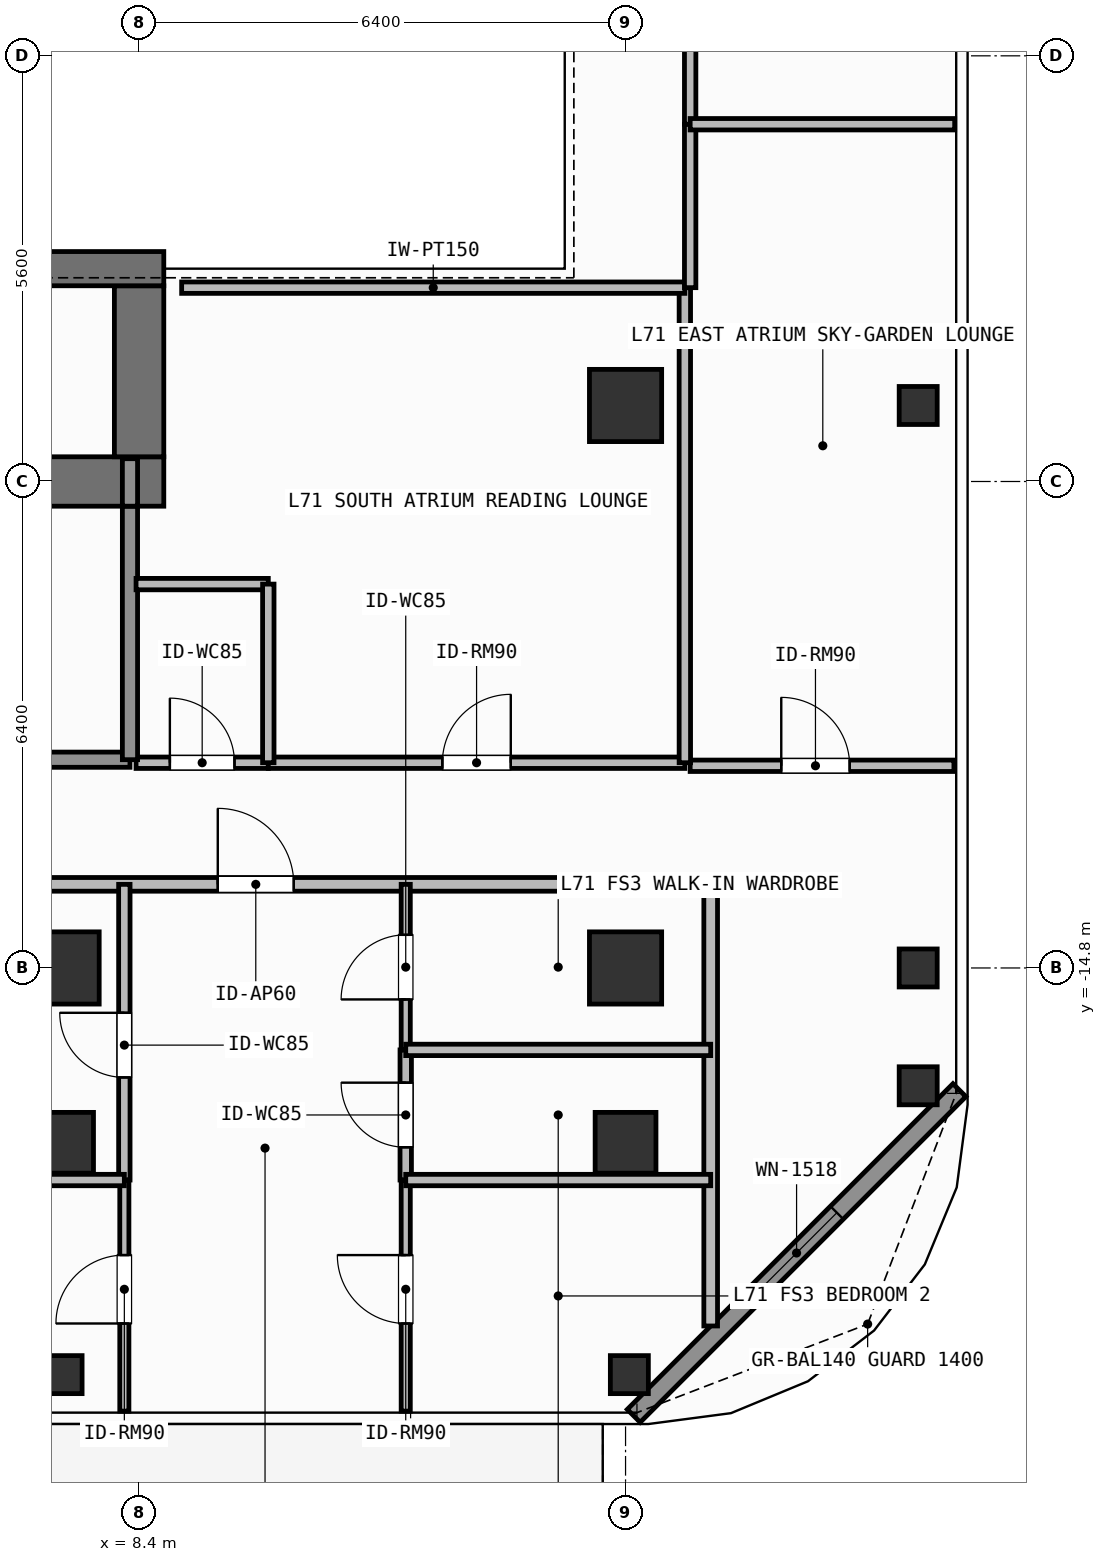
"""IFC4 building model, lengths in metres.
Left out: names, types, materials, properties, quantities, classifications, styles, units other than length and angle.
Written with IfcOpenShell. Run it as: python <this file> out.ifc"""

import sys

from ifc_helpers import new_model, si_unit, direction, frame, frame_2d, origin, origin_2d, place, context, subcontext, project, spatial, rectangle, hollow_rectangle, extrude, element, fill, save


model = new_model("IFC4")
c1 = context("Model", 3, precision=1e-05, world=origin(), true_north=direction((0.0, 1.0)))
c2 = subcontext(c1, "Body", "Model", "MODEL_VIEW")
j1 = project(units=[si_unit("LENGTHUNIT", "METRE"), si_unit("PLANEANGLEUNIT", "RADIAN")], contexts=[c1])
p1 = place(None, origin())
s1 = spatial("IfcSite", under=j1, at=p1, CompositionType="ELEMENT")
p2 = place(p1, origin())
s2 = spatial("IfcBuilding", under=s1, at=p2, CompositionType="ELEMENT")
p3 = place(p2, frame((0.0, 0.0, 289.8)))
s3 = spatial("IfcBuildingStorey", under=s2, at=p3, CompositionType="ELEMENT", Elevation=289.8)
p4 = place(p3, frame((6.12, -8.4, 0.0), z_axis=(0.0, 0.0, 1.0), x_axis=(1.0, 0.0, 0.0)))
e1 = element("IfcWall", 1, at=p4, inside=s3, PredefinedType="SHEAR", context=c2, shape_type="SweptSolid", body=[
    extrude(rectangle(XDim=2.605, YDim=0.65, at=frame_2d((1.302, 0.0))), origin(), (0.0, 0.0, 1.0), 3.9),
])
p5 = place(p3, frame((8.4, -8.075, 0.0), z_axis=(0.0, 0.0, 1.0), x_axis=(0.0, 1.0, 0.0)))
e2 = element("IfcWall", 2, at=p5, inside=s3, PredefinedType="SHEAR", context=c2, shape_type="SweptSolid", body=[
    extrude(rectangle(XDim=2.25, YDim=0.65, at=frame_2d((1.125, 0.0))), origin(), (0.0, 0.0, 1.0), 3.9),
])
p6 = place(p3, frame((3.045, -5.6, 0.0), z_axis=(0.0, 0.0, 1.0), x_axis=(1.0, 0.0, 0.0)))
e3 = element("IfcWall", 3, at=p6, inside=s3, PredefinedType="SHEAR", context=c2, shape_type="SweptSolid", body=[
    extrude(rectangle(XDim=5.68, YDim=0.45, at=frame_2d((2.84, 0.0))), origin(), (0.0, 0.0, 1.0), 3.9),
])
for number, where, z_axis, x_axis in (
    (4, (7.4, -14.8, 0.0), (0.0, 0.0, 1.0), (1.0, 0.0, 0.0)),
    (5, (14.8, -14.8, 0.0), (0.0, 0.0, 1.0), (1.0, 0.0, 0.0)),
    (6, (14.8, -7.4, 0.0), (0.0, 0.0, 1.0), (1.0, 0.0, 0.0)),
):
    element("IfcColumn", number, at=place(p3, frame(where, z_axis=z_axis, x_axis=x_axis)), inside=s3, PredefinedType="COLUMN", context=c2, shape_type="SweptSolid", body=[
        extrude(rectangle(XDim=0.95, YDim=0.95, at=origin_2d()), origin(), (0.0, 0.0, 1.0), 3.9),
    ])
for number, where, z_axis, x_axis in (
    (7, (7.4, -17.1, 0.0), (0.0, 0.0, 1.0), (1.0, 0.0, 0.0)),
    (8, (14.8, -17.1, 0.0), (0.0, 0.0, 1.0), (1.0, 0.0, 0.0)),
):
    element("IfcColumn", number, at=place(p3, frame(where, z_axis=z_axis, x_axis=x_axis)), inside=s3, PredefinedType="COLUMN", context=c2, shape_type="SweptSolid", body=[
        extrude(hollow_rectangle(XDim=0.8, YDim=0.8, WallThickness=0.036, at=origin_2d()), origin(), (0.0, 0.0, 1.0), 3.9),
    ])
for number, where, z_axis, x_axis in (
    (9, (14.85, -20.15, 0.0), (0.0, 0.0, 1.0), (1.0, 0.0, 0.0)),
    (10, (18.65, -16.35, 0.0), (0.0, 0.0, 1.0), (1.0, 0.0, 0.0)),
    (11, (7.4, -20.15, 0.0), (0.0, 0.0, 1.0), (1.0, 0.0, 0.0)),
    (12, (18.65, -14.8, 0.0), (0.0, 0.0, 1.0), (1.0, 0.0, 0.0)),
    (13, (18.65, -7.4, 0.0), (0.0, 0.0, 1.0), (1.0, 0.0, 0.0)),
):
    element("IfcColumn", number, at=place(p3, frame(where, z_axis=z_axis, x_axis=x_axis)), inside=s3, PredefinedType="COLUMN", context=c2, shape_type="SweptSolid", body=[
        extrude(hollow_rectangle(XDim=0.5, YDim=0.5, WallThickness=0.025, at=origin_2d()), origin(), (0.0, 0.0, 1.0), 3.9),
    ])
p7 = place(p3, frame((19.192, -16.408, 0.0), z_axis=(0.0, 0.0, 1.0), x_axis=(-0.707106781187, -0.707106781187, 0.0)))
e14 = element("IfcWall", 14, at=p7, inside=s3, PredefinedType="SOLIDWALL", context=c2, shape_type="SweptSolid", body=[
    extrude(rectangle(XDim=6.059, YDim=0.24, at=frame_2d((3.03, 0.0))), origin(), (0.0, 0.0, 1.0), 3.68),
])
p8 = place(p7, frame((2.28, 0.0, 0.8)))
e15 = element("IfcOpeningElement", 15, at=p8, cuts=e14, PredefinedType="OPENING", context=c2, shape_type="SweptSolid", body=[
    extrude(rectangle(XDim=1.5, YDim=1.85, at=frame_2d((0.75, 0.925))), frame((0.0, 0.13, 0.0), z_axis=(0.0, -1.0, 0.0), x_axis=(1.0, 0.0, 0.0)), (0.0, 0.0, 1.0), 0.26),
])
p9 = place(p3, frame((4.58, -12.06, 0.0), z_axis=(0.0, 0.0, 1.0), x_axis=(1.0, 0.0, 0.0)))
e16 = element("IfcWall", 16, at=p9, inside=s3, PredefinedType="SOLIDWALL", context=c2, shape_type="SweptSolid", body=[
    extrude(rectangle(XDim=3.7, YDim=0.2, at=frame_2d((1.85, 0.0))), origin(), (0.0, 0.0, 1.0), 3.68),
])
p10 = place(p9, frame((1.212, 0.0, 0.0)))
e17 = element("IfcOpeningElement", 17, at=p10, cuts=e16, PredefinedType="OPENING", context=c2, shape_type="SweptSolid", body=[
    extrude(rectangle(XDim=1.1, YDim=2.15, at=frame_2d((0.55, 1.075))), frame((0.0, 0.11, 0.0), z_axis=(0.0, -1.0, 0.0), x_axis=(1.0, 0.0, 0.0)), (0.0, 0.0, 1.0), 0.22),
])
p11 = place(p3, frame((8.36, -12.1, 0.0), z_axis=(0.0, 0.0, 1.0), x_axis=(1.0, 0.0, 0.0)))
e18 = element("IfcWall", 18, at=p11, inside=s3, PredefinedType="PARTITIONING", context=c2, shape_type="SweptSolid", body=[
    extrude(rectangle(XDim=1.74, YDim=0.15, at=frame_2d((0.87, 0.0))), origin(), (0.0, 0.0, 1.0), 3.68),
])
p12 = place(p11, frame((0.445, 0.0, 0.0)))
e19 = element("IfcOpeningElement", 19, at=p12, cuts=e18, PredefinedType="OPENING", context=c2, shape_type="SweptSolid", body=[
    extrude(rectangle(XDim=0.85, YDim=2.1, at=frame_2d((0.425, 1.05))), frame((0.0, 0.085, 0.0), z_axis=(0.0, -1.0, 0.0), x_axis=(1.0, 0.0, 0.0)), (0.0, 0.0, 1.0), 0.17),
])
p13 = place(p3, frame((10.1, -12.1, 0.0), z_axis=(0.0, 0.0, 1.0), x_axis=(1.0, 0.0, 0.0)))
e20 = element("IfcWall", 20, at=p13, inside=s3, PredefinedType="PARTITIONING", context=c2, shape_type="SweptSolid", body=[
    extrude(rectangle(XDim=5.48, YDim=0.15, at=frame_2d((2.74, 0.0))), origin(), (0.0, 0.0, 1.0), 3.68),
])
p14 = place(p13, frame((2.29, 0.0, 0.0)))
e21 = element("IfcOpeningElement", 21, at=p14, cuts=e20, PredefinedType="OPENING", context=c2, shape_type="SweptSolid", body=[
    extrude(rectangle(XDim=0.9, YDim=2.1, at=frame_2d((0.45, 1.05))), frame((0.0, 0.085, 0.0), z_axis=(0.0, -1.0, 0.0), x_axis=(1.0, 0.0, 0.0)), (0.0, 0.0, 1.0), 0.17),
])
p15 = place(p3, frame((3.063, -13.7, 0.0), z_axis=(0.0, 0.0, 1.0), x_axis=(1.0, 0.0, 0.0)))
e22 = element("IfcWall", 22, at=p15, inside=s3, PredefinedType="PARTITIONING", context=c2, shape_type="SweptSolid", body=[
    extrude(rectangle(XDim=12.857, YDim=0.18, at=frame_2d((6.428, 0.0))), origin(), (0.0, 0.0, 1.0), 3.68),
])
p16 = place(p15, frame((6.372, 0.0, 0.0)))
e23 = element("IfcOpeningElement", 23, at=p16, cuts=e22, PredefinedType="OPENING", context=c2, shape_type="SweptSolid", body=[
    extrude(rectangle(XDim=1.0, YDim=2.2, at=frame_2d((0.5, 1.1))), frame((0.0, 0.1, 0.0), z_axis=(0.0, -1.0, 0.0), x_axis=(1.0, 0.0, 0.0)), (0.0, 0.0, 1.0), 0.2),
])
p17 = place(p3, frame((8.206, -17.59, 0.0), z_axis=(0.0, 0.0, 1.0), x_axis=(0.0, 1.0, 0.0)))
e24 = element("IfcWall", 24, at=p17, inside=s3, PredefinedType="PARTITIONING", context=c2, shape_type="SweptSolid", body=[
    extrude(rectangle(XDim=3.89, YDim=0.15, at=frame_2d((1.945, 0.0))), origin(), (0.0, 0.0, 1.0), 3.68),
])
p18 = place(p17, frame((1.35, 0.0, 0.0)))
e25 = element("IfcOpeningElement", 25, at=p18, cuts=e24, PredefinedType="OPENING", context=c2, shape_type="SweptSolid", body=[
    extrude(rectangle(XDim=0.85, YDim=2.1, at=frame_2d((0.425, 1.05))), frame((0.0, 0.085, 0.0), z_axis=(0.0, -1.0, 0.0), x_axis=(1.0, 0.0, 0.0)), (0.0, 0.0, 1.0), 0.17),
])
p19 = place(p3, frame((8.206, -20.63, 0.0), z_axis=(0.0, 0.0, 1.0), x_axis=(0.0, 1.0, 0.0)))
e26 = element("IfcWall", 26, at=p19, inside=s3, PredefinedType="PARTITIONING", context=c2, shape_type="SweptSolid", body=[
    extrude(rectangle(XDim=3.04, YDim=0.12, at=frame_2d((1.52, 0.0))), origin(), (0.0, 0.0, 1.0), 3.68),
])
p20 = place(p19, frame((1.153, 0.0, 0.0)))
e27 = element("IfcOpeningElement", 27, at=p20, cuts=e26, PredefinedType="OPENING", context=c2, shape_type="SweptSolid", body=[
    extrude(rectangle(XDim=0.9, YDim=2.1, at=frame_2d((0.45, 1.05))), frame((0.0, 0.07, 0.0), z_axis=(0.0, -1.0, 0.0), x_axis=(1.0, 0.0, 0.0)), (0.0, 0.0, 1.0), 0.14),
])
p21 = place(p3, frame((11.908, -17.59, 0.0), z_axis=(0.0, 0.0, 1.0), x_axis=(0.0, 1.0, 0.0)))
e28 = element("IfcWall", 28, at=p21, inside=s3, PredefinedType="PARTITIONING", context=c2, shape_type="SweptSolid", body=[
    extrude(rectangle(XDim=1.712, YDim=0.15, at=frame_2d((0.856, 0.0))), origin(), (0.0, 0.0, 1.0), 3.68),
])
p22 = place(p21, frame((0.431, 0.0, 0.0)))
e29 = element("IfcOpeningElement", 29, at=p22, cuts=e28, PredefinedType="OPENING", context=c2, shape_type="SweptSolid", body=[
    extrude(rectangle(XDim=0.85, YDim=2.1, at=frame_2d((0.425, 1.05))), frame((0.0, 0.085, 0.0), z_axis=(0.0, -1.0, 0.0), x_axis=(1.0, 0.0, 0.0)), (0.0, 0.0, 1.0), 0.17),
])
p23 = place(p3, frame((11.908, -15.878, 0.0), z_axis=(0.0, 0.0, 1.0), x_axis=(0.0, 1.0, 0.0)))
e30 = element("IfcWall", 30, at=p23, inside=s3, PredefinedType="PARTITIONING", context=c2, shape_type="SweptSolid", body=[
    extrude(rectangle(XDim=2.178, YDim=0.12, at=frame_2d((1.089, 0.0))), origin(), (0.0, 0.0, 1.0), 3.68),
])
p24 = place(p23, frame((0.664, 0.0, 0.0)))
e31 = element("IfcOpeningElement", 31, at=p24, cuts=e30, PredefinedType="OPENING", context=c2, shape_type="SweptSolid", body=[
    extrude(rectangle(XDim=0.85, YDim=2.1, at=frame_2d((0.425, 1.05))), frame((0.0, 0.07, 0.0), z_axis=(0.0, -1.0, 0.0), x_axis=(1.0, 0.0, 0.0)), (0.0, 0.0, 1.0), 0.14),
])
p25 = place(p3, frame((11.908, -20.63, 0.0), z_axis=(0.0, 0.0, 1.0), x_axis=(0.0, 1.0, 0.0)))
e32 = element("IfcWall", 32, at=p25, inside=s3, PredefinedType="PARTITIONING", context=c2, shape_type="SweptSolid", body=[
    extrude(rectangle(XDim=3.04, YDim=0.12, at=frame_2d((1.52, 0.0))), origin(), (0.0, 0.0, 1.0), 3.68),
])
p26 = place(p25, frame((1.153, 0.0, 0.0)))
e33 = element("IfcOpeningElement", 33, at=p26, cuts=e32, PredefinedType="OPENING", context=c2, shape_type="SweptSolid", body=[
    extrude(rectangle(XDim=0.9, YDim=2.1, at=frame_2d((0.45, 1.05))), frame((0.0, 0.07, 0.0), z_axis=(0.0, -1.0, 0.0), x_axis=(1.0, 0.0, 0.0)), (0.0, 0.0, 1.0), 0.14),
])
p27 = place(p3, frame((15.65, -12.14, 0.0), z_axis=(0.0, 0.0, 1.0), x_axis=(1.0, 0.0, 0.0)))
e34 = element("IfcWall", 34, at=p27, inside=s3, PredefinedType="PARTITIONING", context=c2, shape_type="SweptSolid", body=[
    extrude(rectangle(XDim=3.47, YDim=0.15, at=frame_2d((1.735, 0.0))), origin(), (0.0, 0.0, 1.0), 3.68),
])
p28 = place(p27, frame((1.198, 0.0, 0.0)))
e35 = element("IfcOpeningElement", 35, at=p28, cuts=e34, PredefinedType="OPENING", context=c2, shape_type="SweptSolid", body=[
    extrude(rectangle(XDim=0.9, YDim=2.1, at=frame_2d((0.45, 1.05))), frame((0.0, 0.085, 0.0), z_axis=(0.0, -1.0, 0.0), x_axis=(1.0, 0.0, 0.0)), (0.0, 0.0, 1.0), 0.17),
])
p29 = place(p3, frame((8.28, -12.06, 0.0), z_axis=(0.0, 0.0, 1.0), x_axis=(0.0, 1.0, 0.0)))
e36 = element("IfcWall", 36, at=p29, inside=s3, PredefinedType="SOLIDWALL", context=c2, shape_type="SweptSolid", body=[
    extrude(rectangle(XDim=3.335, YDim=0.2, at=frame_2d((1.667, 0.0))), origin(), (0.0, 0.0, 1.0), 3.68),
])
p30 = place(p3, frame((8.28, -8.725, 0.0), z_axis=(0.0, 0.0, 1.0), x_axis=(0.0, 1.0, 0.0)))
e37 = element("IfcWall", 37, at=p30, inside=s3, PredefinedType="SOLIDWALL", context=c2, shape_type="SweptSolid", body=[
    extrude(rectangle(XDim=0.625, YDim=0.2, at=frame_2d((0.312, 0.0))), origin(), (0.0, 0.0, 1.0), 3.68),
])
p31 = place(p3, frame((8.36, -9.75, 0.0), z_axis=(0.0, 0.0, 1.0), x_axis=(1.0, 0.0, 0.0)))
e38 = element("IfcWall", 38, at=p31, inside=s3, PredefinedType="PARTITIONING", context=c2, shape_type="SweptSolid", body=[
    extrude(rectangle(XDim=1.74, YDim=0.15, at=frame_2d((0.87, 0.0))), origin(), (0.0, 0.0, 1.0), 3.68),
])
p32 = place(p3, frame((10.1, -12.1, 0.0), z_axis=(0.0, 0.0, 1.0), x_axis=(0.0, 1.0, 0.0)))
e39 = element("IfcWall", 39, at=p32, inside=s3, PredefinedType="PARTITIONING", context=c2, shape_type="SweptSolid", body=[
    extrude(rectangle(XDim=2.35, YDim=0.15, at=frame_2d((1.175, 0.0))), origin(), (0.0, 0.0, 1.0), 3.68),
])
p33 = place(p3, frame((15.58, -12.1, 0.0), z_axis=(0.0, 0.0, 1.0), x_axis=(0.0, 1.0, 0.0)))
e40 = element("IfcWall", 40, at=p33, inside=s3, PredefinedType="PARTITIONING", context=c2, shape_type="SweptSolid", body=[
    extrude(rectangle(XDim=6.25, YDim=0.15, at=frame_2d((3.125, 0.0))), origin(), (0.0, 0.0, 1.0), 3.68),
])
p34 = place(p3, frame((8.96, -5.85, 0.0), z_axis=(0.0, 0.0, 1.0), x_axis=(1.0, 0.0, 0.0)))
e41 = element("IfcWall", 41, at=p34, inside=s3, PredefinedType="PARTITIONING", context=c2, shape_type="SweptSolid", body=[
    extrude(rectangle(XDim=6.62, YDim=0.15, at=frame_2d((3.31, 0.0))), origin(), (0.0, 0.0, 1.0), 3.68),
])
p35 = place(p3, frame((15.92, -19.51, 0.0), z_axis=(0.0, 0.0, 1.0), x_axis=(0.0, 1.0, 0.0)))
e42 = element("IfcWall", 42, at=p35, inside=s3, PredefinedType="PARTITIONING", context=c2, shape_type="SweptSolid", body=[
    extrude(rectangle(XDim=5.81, YDim=0.18, at=frame_2d((2.905, 0.0))), origin(), (0.0, 0.0, 1.0), 3.68),
])
p36 = place(p3, frame((3.063, -17.59, 0.0), z_axis=(0.0, 0.0, 1.0), x_axis=(1.0, 0.0, 0.0)))
e43 = element("IfcWall", 43, at=p36, inside=s3, PredefinedType="PARTITIONING", context=c2, shape_type="SweptSolid", body=[
    extrude(rectangle(XDim=5.143, YDim=0.15, at=frame_2d((2.572, 0.0))), origin(), (0.0, 0.0, 1.0), 3.68),
])
for number, where, z_axis, x_axis in (
    (44, (11.908, -15.878, 0.0), (0.0, 0.0, 1.0), (1.0, 0.0, 0.0)),
    (45, (11.908, -17.59, 0.0), (0.0, 0.0, 1.0), (1.0, 0.0, 0.0)),
):
    element("IfcWall", number, at=place(p3, frame(where, z_axis=z_axis, x_axis=x_axis)), inside=s3, PredefinedType="PARTITIONING", context=c2, shape_type="SweptSolid", body=[
        extrude(rectangle(XDim=4.012, YDim=0.15, at=frame_2d((2.006, 0.0))), origin(), (0.0, 0.0, 1.0), 3.68),
    ])
p37 = place(p3, frame((15.65, -5.85, 0.0), z_axis=(0.0, 0.0, 1.0), x_axis=(0.0, 1.0, 0.0)))
e46 = element("IfcWall", 46, at=p37, inside=s3, PredefinedType="PARTITIONING", context=c2, shape_type="SweptSolid", body=[
    extrude(rectangle(XDim=2.15, YDim=0.15, at=frame_2d((1.075, 0.0))), origin(), (0.0, 0.0, 1.0), 3.68),
])
p38 = place(p3, frame((15.65, -3.7, 0.0), z_axis=(0.0, 0.0, 1.0), x_axis=(0.0, 1.0, 0.0)))
e47 = element("IfcWall", 47, at=p38, inside=s3, PredefinedType="PARTITIONING", context=c2, shape_type="SweptSolid", body=[
    extrude(rectangle(XDim=9.55, YDim=0.15, at=frame_2d((4.775, 0.0))), origin(), (0.0, 0.0, 1.0), 3.68),
])
p39 = place(p3, frame((15.65, -3.7, 0.0), z_axis=(0.0, 0.0, 1.0), x_axis=(1.0, 0.0, 0.0)))
e48 = element("IfcWall", 48, at=p39, inside=s3, PredefinedType="PARTITIONING", context=c2, shape_type="SweptSolid", body=[
    extrude(rectangle(XDim=3.48, YDim=0.15, at=frame_2d((1.74, 0.0))), origin(), (0.0, 0.0, 1.0), 3.68),
])
p40 = place(p8, origin())
e49 = element("IfcWindow", 49, at=p40, inside=s3, PartitioningType="SINGLE_PANEL", PredefinedType="WINDOW", context=c2, shape_type="SweptSolid", body=[
    extrude(rectangle(XDim=1.5, YDim=1.85, at=frame_2d((0.75, 0.925))), frame((0.0, 0.03, 0.0), z_axis=(0.0, -1.0, 0.0), x_axis=(1.0, 0.0, 0.0)), (0.0, 0.0, 1.0), 0.06),
])
fill(e15, e49)
p41 = place(p12, origin())
e50 = element("IfcDoor", 50, at=p41, inside=s3, OperationType="SINGLE_SWING_LEFT", PredefinedType="DOOR", context=c2, shape_type="SweptSolid", body=[
    extrude(rectangle(XDim=0.85, YDim=2.1, at=frame_2d((0.425, 1.05))), frame((0.0, 0.025, 0.0), z_axis=(0.0, -1.0, 0.0), x_axis=(1.0, 0.0, 0.0)), (0.0, 0.0, 1.0), 0.05),
])
fill(e19, e50)
p42 = place(p14, origin())
e51 = element("IfcDoor", 51, at=p42, inside=s3, OperationType="SINGLE_SWING_RIGHT", PredefinedType="DOOR", context=c2, shape_type="SweptSolid", body=[
    extrude(rectangle(XDim=0.9, YDim=2.1, at=frame_2d((0.45, 1.05))), frame((0.0, 0.025, 0.0), z_axis=(0.0, -1.0, 0.0), x_axis=(1.0, 0.0, 0.0)), (0.0, 0.0, 1.0), 0.05),
])
fill(e21, e51)
p43 = place(p16, origin())
e52 = element("IfcDoor", 52, at=p43, inside=s3, OperationType="SINGLE_SWING_LEFT", PredefinedType="DOOR", context=c2, shape_type="SweptSolid", body=[
    extrude(rectangle(XDim=1.0, YDim=2.2, at=frame_2d((0.5, 1.1))), frame((0.0, 0.025, 0.0), z_axis=(0.0, -1.0, 0.0), x_axis=(1.0, 0.0, 0.0)), (0.0, 0.0, 1.0), 0.05),
])
fill(e23, e52)
p44 = place(p18, origin())
e53 = element("IfcDoor", 53, at=p44, inside=s3, OperationType="SINGLE_SWING_RIGHT", PredefinedType="DOOR", context=c2, shape_type="SweptSolid", body=[
    extrude(rectangle(XDim=0.85, YDim=2.1, at=frame_2d((0.425, 1.05))), frame((0.0, 0.025, 0.0), z_axis=(0.0, -1.0, 0.0), x_axis=(1.0, 0.0, 0.0)), (0.0, 0.0, 1.0), 0.05),
])
fill(e25, e53)
p45 = place(p20, origin())
e54 = element("IfcDoor", 54, at=p45, inside=s3, OperationType="SINGLE_SWING_LEFT", PredefinedType="DOOR", context=c2, shape_type="SweptSolid", body=[
    extrude(rectangle(XDim=0.9, YDim=2.1, at=frame_2d((0.45, 1.05))), frame((0.0, 0.025, 0.0), z_axis=(0.0, -1.0, 0.0), x_axis=(1.0, 0.0, 0.0)), (0.0, 0.0, 1.0), 0.05),
])
fill(e27, e54)
p46 = place(p22, origin())
e55 = element("IfcDoor", 55, at=p46, inside=s3, OperationType="SINGLE_SWING_RIGHT", PredefinedType="DOOR", context=c2, shape_type="SweptSolid", body=[
    extrude(rectangle(XDim=0.85, YDim=2.1, at=frame_2d((0.425, 1.05))), frame((0.0, 0.025, 0.0), z_axis=(0.0, -1.0, 0.0), x_axis=(1.0, 0.0, 0.0)), (0.0, 0.0, 1.0), 0.05),
])
fill(e29, e55)
p47 = place(p24, origin())
e56 = element("IfcDoor", 56, at=p47, inside=s3, OperationType="SINGLE_SWING_LEFT", PredefinedType="DOOR", context=c2, shape_type="SweptSolid", body=[
    extrude(rectangle(XDim=0.85, YDim=2.1, at=frame_2d((0.425, 1.05))), frame((0.0, 0.025, 0.0), z_axis=(0.0, -1.0, 0.0), x_axis=(1.0, 0.0, 0.0)), (0.0, 0.0, 1.0), 0.05),
])
fill(e31, e56)
p48 = place(p26, origin())
e57 = element("IfcDoor", 57, at=p48, inside=s3, OperationType="SINGLE_SWING_RIGHT", PredefinedType="DOOR", context=c2, shape_type="SweptSolid", body=[
    extrude(rectangle(XDim=0.9, YDim=2.1, at=frame_2d((0.45, 1.05))), frame((0.0, 0.025, 0.0), z_axis=(0.0, -1.0, 0.0), x_axis=(1.0, 0.0, 0.0)), (0.0, 0.0, 1.0), 0.05),
])
fill(e33, e57)
p49 = place(p28, origin())
e58 = element("IfcDoor", 58, at=p49, inside=s3, OperationType="SINGLE_SWING_LEFT", PredefinedType="DOOR", context=c2, shape_type="SweptSolid", body=[
    extrude(rectangle(XDim=0.9, YDim=2.1, at=frame_2d((0.45, 1.05))), frame((0.0, 0.025, 0.0), z_axis=(0.0, -1.0, 0.0), x_axis=(1.0, 0.0, 0.0)), (0.0, 0.0, 1.0), 0.05),
])
fill(e35, e58)
save(model, sys.argv[1])
